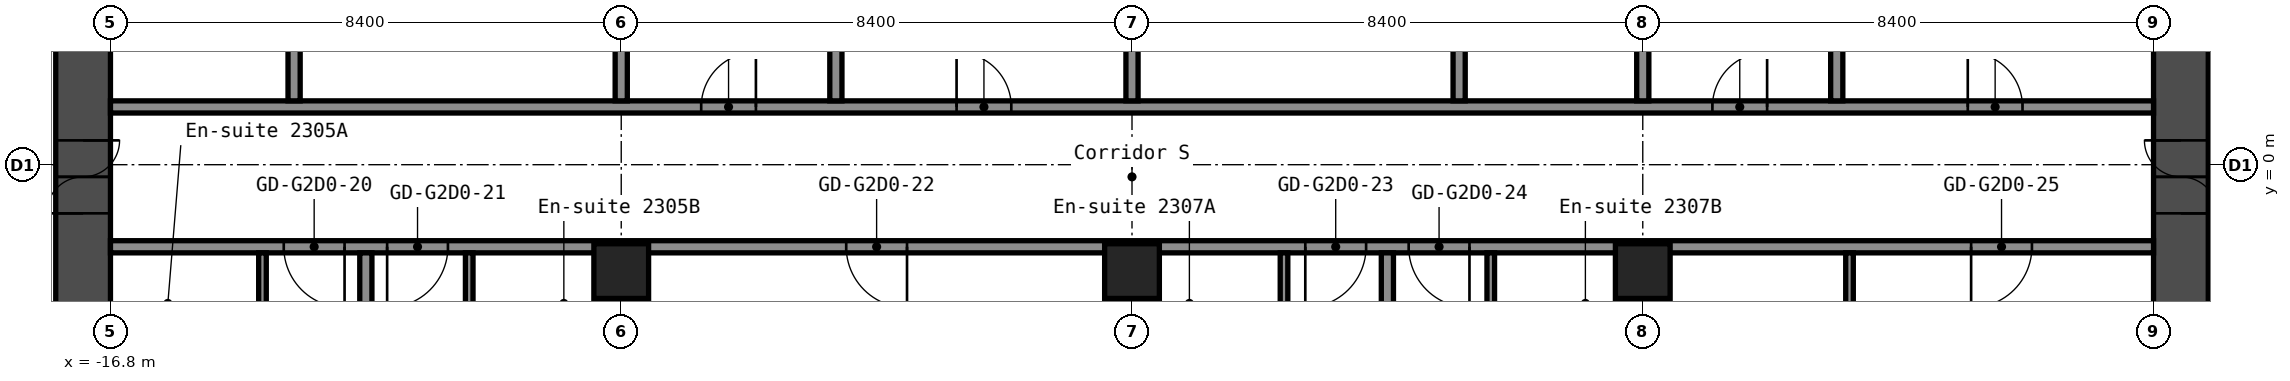
"""IFC4 building model, lengths in metres.
Left out: names, types, materials, properties, quantities, classifications, styles, units other than length and angle.
Written with IfcOpenShell. Run it as: python <this file> out.ifc"""

import sys

from ifc_helpers import new_model, si_unit, direction, frame, frame_2d, origin, origin_2d, place, context, subcontext, project, spatial, rectangle, hollow_rectangle, extrude, element, fill, save


model = new_model("IFC4")
c1 = context("Model", 3, precision=1e-05, world=origin(), true_north=direction((0.0, 1.0)))
c2 = subcontext(c1, "Body", "Model", "MODEL_VIEW")
j1 = project(units=[si_unit("LENGTHUNIT", "METRE"), si_unit("PLANEANGLEUNIT", "RADIAN")], contexts=[c1])
p1 = place(None, origin())
s1 = spatial("IfcSite", under=j1, at=p1, CompositionType="ELEMENT")
p2 = place(p1, origin())
s2 = spatial("IfcBuilding", under=s1, at=p2, CompositionType="ELEMENT")
p3 = place(p2, frame((0.0, 0.0, 85.0)))
s3 = spatial("IfcBuildingStorey", under=s2, at=p3, CompositionType="ELEMENT", Elevation=85.0)
for number, where, z_axis, x_axis in (
    (1, (-8.4, -1.75, 0.0), (0.0, 0.0, 1.0), (1.0, 0.0, 0.0)),
    (2, (0.0, -1.75, 0.0), (0.0, 0.0, 1.0), (1.0, 0.0, 0.0)),
    (3, (8.4, -1.75, 0.0), (0.0, 0.0, 1.0), (1.0, 0.0, 0.0)),
):
    element("IfcColumn", number, at=place(p3, frame(where, z_axis=z_axis, x_axis=x_axis)), inside=s3, PredefinedType="COLUMN", context=c2, shape_type="SweptSolid", body=[
        extrude(hollow_rectangle(XDim=0.9, YDim=0.9, WallThickness=0.036, at=origin_2d()), origin(), (0.0, 0.0, 1.0), 2.8),
    ])
p4 = place(p3, frame((-17.25, -8.4, 0.0), z_axis=(0.0, 0.0, 1.0), x_axis=(0.0, 1.0, 0.0)))
e4 = element("IfcWall", 4, at=p4, inside=s3, PredefinedType="SHEAR", context=c2, shape_type="SweptSolid", body=[
    extrude(rectangle(XDim=16.8, YDim=0.9, at=frame_2d((8.4, 0.0))), origin(), (0.0, 0.0, 1.0), 2.8),
])
p5 = place(p4, frame((7.6, 0.0, 0.0)))
e5 = element("IfcOpeningElement", 5, at=p5, cuts=e4, PredefinedType="OPENING", context=c2, shape_type="SweptSolid", body=[
    extrude(rectangle(XDim=1.2, YDim=2.1, at=frame_2d((0.6, 1.05))), frame((0.0, 0.46, 0.0), z_axis=(0.0, -1.0, 0.0), x_axis=(1.0, 0.0, 0.0)), (0.0, 0.0, 1.0), 0.92),
])
p6 = place(p3, frame((17.25, -8.4, 0.0), z_axis=(0.0, 0.0, 1.0), x_axis=(0.0, 1.0, 0.0)))
e6 = element("IfcWall", 6, at=p6, inside=s3, PredefinedType="SHEAR", context=c2, shape_type="SweptSolid", body=[
    extrude(rectangle(XDim=16.8, YDim=0.9, at=frame_2d((8.4, 0.0))), origin(), (0.0, 0.0, 1.0), 2.8),
])
p7 = place(p6, frame((7.6, 0.0, 0.0)))
e7 = element("IfcOpeningElement", 7, at=p7, cuts=e6, PredefinedType="OPENING", context=c2, shape_type="SweptSolid", body=[
    extrude(rectangle(XDim=1.2, YDim=2.1, at=frame_2d((0.6, 1.05))), frame((0.0, 0.46, 0.0), z_axis=(0.0, -1.0, 0.0), x_axis=(1.0, 0.0, 0.0)), (0.0, 0.0, 1.0), 0.92),
])
p8 = place(p3, frame((-16.8, -1.35, 0.0), z_axis=(0.0, 0.0, 1.0), x_axis=(1.0, 0.0, 0.0)))
e8 = element("IfcWall", 8, at=p8, inside=s3, PredefinedType="PARTITIONING", context=c2, shape_type="SweptSolid", body=[
    extrude(rectangle(XDim=33.6, YDim=0.2, at=frame_2d((16.8, 0.0))), origin(), (0.0, 0.0, 1.0), 2.8),
])
p9 = place(p8, frame((2.85, 0.0, 0.0)))
e9 = element("IfcOpeningElement", 9, at=p9, cuts=e8, PredefinedType="OPENING", context=c2, shape_type="SweptSolid", body=[
    extrude(rectangle(XDim=1.0, YDim=2.1, at=frame_2d((0.5, 1.05))), frame((0.0, 0.11, 0.0), z_axis=(0.0, -1.0, 0.0), x_axis=(1.0, 0.0, 0.0)), (0.0, 0.0, 1.0), 0.22),
])
p10 = place(p8, frame((4.55, 0.0, 0.0)))
e10 = element("IfcOpeningElement", 10, at=p10, cuts=e8, PredefinedType="OPENING", context=c2, shape_type="SweptSolid", body=[
    extrude(rectangle(XDim=1.0, YDim=2.1, at=frame_2d((0.5, 1.05))), frame((0.0, 0.11, 0.0), z_axis=(0.0, -1.0, 0.0), x_axis=(1.0, 0.0, 0.0)), (0.0, 0.0, 1.0), 0.22),
])
p11 = place(p8, frame((12.1, 0.0, 0.0)))
e11 = element("IfcOpeningElement", 11, at=p11, cuts=e8, PredefinedType="OPENING", context=c2, shape_type="SweptSolid", body=[
    extrude(rectangle(XDim=1.0, YDim=2.1, at=frame_2d((0.5, 1.05))), frame((0.0, 0.11, 0.0), z_axis=(0.0, -1.0, 0.0), x_axis=(1.0, 0.0, 0.0)), (0.0, 0.0, 1.0), 0.22),
])
p12 = place(p8, frame((19.65, 0.0, 0.0)))
e12 = element("IfcOpeningElement", 12, at=p12, cuts=e8, PredefinedType="OPENING", context=c2, shape_type="SweptSolid", body=[
    extrude(rectangle(XDim=1.0, YDim=2.1, at=frame_2d((0.5, 1.05))), frame((0.0, 0.11, 0.0), z_axis=(0.0, -1.0, 0.0), x_axis=(1.0, 0.0, 0.0)), (0.0, 0.0, 1.0), 0.22),
])
p13 = place(p8, frame((21.35, 0.0, 0.0)))
e13 = element("IfcOpeningElement", 13, at=p13, cuts=e8, PredefinedType="OPENING", context=c2, shape_type="SweptSolid", body=[
    extrude(rectangle(XDim=1.0, YDim=2.1, at=frame_2d((0.5, 1.05))), frame((0.0, 0.11, 0.0), z_axis=(0.0, -1.0, 0.0), x_axis=(1.0, 0.0, 0.0)), (0.0, 0.0, 1.0), 0.22),
])
p14 = place(p8, frame((30.6, 0.0, 0.0)))
e14 = element("IfcOpeningElement", 14, at=p14, cuts=e8, PredefinedType="OPENING", context=c2, shape_type="SweptSolid", body=[
    extrude(rectangle(XDim=1.0, YDim=2.1, at=frame_2d((0.5, 1.05))), frame((0.0, 0.11, 0.0), z_axis=(0.0, -1.0, 0.0), x_axis=(1.0, 0.0, 0.0)), (0.0, 0.0, 1.0), 0.22),
])
p15 = place(p3, frame((-16.8, 0.95, 0.0), z_axis=(0.0, 0.0, 1.0), x_axis=(1.0, 0.0, 0.0)))
e15 = element("IfcWall", 15, at=p15, inside=s3, PredefinedType="PARTITIONING", context=c2, shape_type="SweptSolid", body=[
    extrude(rectangle(XDim=33.6, YDim=0.2, at=frame_2d((16.8, 0.0))), origin(), (0.0, 0.0, 1.0), 2.8),
])
p16 = place(p15, frame((9.715, 0.0, 0.0)))
e16 = element("IfcOpeningElement", 16, at=p16, cuts=e15, PredefinedType="OPENING", context=c2, shape_type="SweptSolid", body=[
    extrude(rectangle(XDim=0.9, YDim=2.1, at=frame_2d((0.45, 1.05))), frame((0.0, 0.11, 0.0), z_axis=(0.0, -1.0, 0.0), x_axis=(1.0, 0.0, 0.0)), (0.0, 0.0, 1.0), 0.22),
])
p17 = place(p15, frame((13.915, 0.0, 0.0)))
e17 = element("IfcOpeningElement", 17, at=p17, cuts=e15, PredefinedType="OPENING", context=c2, shape_type="SweptSolid", body=[
    extrude(rectangle(XDim=0.9, YDim=2.1, at=frame_2d((0.45, 1.05))), frame((0.0, 0.11, 0.0), z_axis=(0.0, -1.0, 0.0), x_axis=(1.0, 0.0, 0.0)), (0.0, 0.0, 1.0), 0.22),
])
p18 = place(p15, frame((26.345, 0.0, 0.0)))
e18 = element("IfcOpeningElement", 18, at=p18, cuts=e15, PredefinedType="OPENING", context=c2, shape_type="SweptSolid", body=[
    extrude(rectangle(XDim=0.9, YDim=2.1, at=frame_2d((0.45, 1.05))), frame((0.0, 0.11, 0.0), z_axis=(0.0, -1.0, 0.0), x_axis=(1.0, 0.0, 0.0)), (0.0, 0.0, 1.0), 0.22),
])
p19 = place(p15, frame((30.545, 0.0, 0.0)))
e19 = element("IfcOpeningElement", 19, at=p19, cuts=e15, PredefinedType="OPENING", context=c2, shape_type="SweptSolid", body=[
    extrude(rectangle(XDim=0.9, YDim=2.1, at=frame_2d((0.45, 1.05))), frame((0.0, 0.11, 0.0), z_axis=(0.0, -1.0, 0.0), x_axis=(1.0, 0.0, 0.0)), (0.0, 0.0, 1.0), 0.22),
])
p20 = place(p3, frame((-14.3, -4.35, 0.0), z_axis=(0.0, 0.0, 1.0), x_axis=(0.0, 1.0, 0.0)))
e20 = element("IfcWall", 20, at=p20, inside=s3, PredefinedType="PARTITIONING", context=c2, shape_type="SweptSolid", body=[
    extrude(rectangle(XDim=2.9, YDim=0.125, at=frame_2d((1.45, 0.0))), origin(), (0.0, 0.0, 1.0), 2.8),
])
p21 = place(p20, frame((0.6, 0.0, 0.0)))
e21 = element("IfcOpeningElement", 21, at=p21, cuts=e20, PredefinedType="OPENING", context=c2, shape_type="SweptSolid", body=[
    extrude(rectangle(XDim=0.8, YDim=2.1, at=frame_2d((0.4, 1.05))), frame((0.0, 0.073, 0.0), z_axis=(0.0, -1.0, 0.0), x_axis=(1.0, 0.0, 0.0)), (0.0, 0.0, 1.0), 0.145),
])
p22 = place(p3, frame((-13.78, 1.05, 0.0), z_axis=(0.0, 0.0, 1.0), x_axis=(0.0, 1.0, 0.0)))
e22 = element("IfcWall", 22, at=p22, inside=s3, PredefinedType="PARTITIONING", context=c2, shape_type="SweptSolid", body=[
    extrude(rectangle(XDim=5.9, YDim=0.2, at=frame_2d((2.95, 0.0))), origin(), (0.0, 0.0, 1.0), 2.8),
])
p23 = place(p3, frame((-12.6, -15.55, 0.0), z_axis=(0.0, 0.0, 1.0), x_axis=(0.0, 1.0, 0.0)))
e23 = element("IfcWall", 23, at=p23, inside=s3, PredefinedType="PARTITIONING", context=c2, shape_type="SweptSolid", body=[
    extrude(rectangle(XDim=14.1, YDim=0.2, at=frame_2d((7.05, 0.0))), origin(), (0.0, 0.0, 1.0), 2.8),
])
p24 = place(p3, frame((-10.9, -4.35, 0.0), z_axis=(0.0, 0.0, 1.0), x_axis=(0.0, 1.0, 0.0)))
e24 = element("IfcWall", 24, at=p24, inside=s3, PredefinedType="PARTITIONING", context=c2, shape_type="SweptSolid", body=[
    extrude(rectangle(XDim=2.9, YDim=0.125, at=frame_2d((1.45, 0.0))), origin(), (0.0, 0.0, 1.0), 2.8),
])
p25 = place(p24, frame((0.6, 0.0, 0.0)))
e25 = element("IfcOpeningElement", 25, at=p25, cuts=e24, PredefinedType="OPENING", context=c2, shape_type="SweptSolid", body=[
    extrude(rectangle(XDim=0.8, YDim=2.1, at=frame_2d((0.4, 1.05))), frame((0.0, 0.073, 0.0), z_axis=(0.0, -1.0, 0.0), x_axis=(1.0, 0.0, 0.0)), (0.0, 0.0, 1.0), 0.145),
])
p26 = place(p3, frame((-8.4, -15.55, 0.0), z_axis=(0.0, 0.0, 1.0), x_axis=(0.0, 1.0, 0.0)))
e26 = element("IfcWall", 26, at=p26, inside=s3, PredefinedType="PARTITIONING", context=c2, shape_type="SweptSolid", body=[
    extrude(rectangle(XDim=13.36, YDim=0.2, at=frame_2d((6.68, 0.0))), origin(), (0.0, 0.0, 1.0), 2.8),
])
for number, where, z_axis, x_axis in (
    (27, (-8.4, 1.05, 0.0), (0.0, 0.0, 1.0), (0.0, 1.0, 0.0)),
    (28, (-4.87, 1.05, 0.0), (0.0, 0.0, 1.0), (0.0, 1.0, 0.0)),
):
    element("IfcWall", number, at=place(p3, frame(where, z_axis=z_axis, x_axis=x_axis)), inside=s3, PredefinedType="PARTITIONING", context=c2, shape_type="SweptSolid", body=[
        extrude(rectangle(XDim=5.9, YDim=0.2, at=frame_2d((2.95, 0.0))), origin(), (0.0, 0.0, 1.0), 2.8),
    ])
p27 = place(p3, frame((0.0, -15.55, 0.0), z_axis=(0.0, 0.0, 1.0), x_axis=(0.0, 1.0, 0.0)))
e29 = element("IfcWall", 29, at=p27, inside=s3, PredefinedType="PARTITIONING", context=c2, shape_type="SweptSolid", body=[
    extrude(rectangle(XDim=13.36, YDim=0.2, at=frame_2d((6.68, 0.0))), origin(), (0.0, 0.0, 1.0), 2.8),
])
p28 = place(p3, frame((0.0, 1.05, 0.0), z_axis=(0.0, 0.0, 1.0), x_axis=(0.0, 1.0, 0.0)))
e30 = element("IfcWall", 30, at=p28, inside=s3, PredefinedType="PARTITIONING", context=c2, shape_type="SweptSolid", body=[
    extrude(rectangle(XDim=5.9, YDim=0.2, at=frame_2d((2.95, 0.0))), origin(), (0.0, 0.0, 1.0), 2.8),
])
p29 = place(p3, frame((2.5, -4.35, 0.0), z_axis=(0.0, 0.0, 1.0), x_axis=(0.0, 1.0, 0.0)))
e31 = element("IfcWall", 31, at=p29, inside=s3, PredefinedType="PARTITIONING", context=c2, shape_type="SweptSolid", body=[
    extrude(rectangle(XDim=2.9, YDim=0.125, at=frame_2d((1.45, 0.0))), origin(), (0.0, 0.0, 1.0), 2.8),
])
p30 = place(p29, frame((0.6, 0.0, 0.0)))
e32 = element("IfcOpeningElement", 32, at=p30, cuts=e31, PredefinedType="OPENING", context=c2, shape_type="SweptSolid", body=[
    extrude(rectangle(XDim=0.8, YDim=2.1, at=frame_2d((0.4, 1.05))), frame((0.0, 0.073, 0.0), z_axis=(0.0, -1.0, 0.0), x_axis=(1.0, 0.0, 0.0)), (0.0, 0.0, 1.0), 0.145),
])
p31 = place(p3, frame((4.2, -15.55, 0.0), z_axis=(0.0, 0.0, 1.0), x_axis=(0.0, 1.0, 0.0)))
e33 = element("IfcWall", 33, at=p31, inside=s3, PredefinedType="PARTITIONING", context=c2, shape_type="SweptSolid", body=[
    extrude(rectangle(XDim=14.1, YDim=0.2, at=frame_2d((7.05, 0.0))), origin(), (0.0, 0.0, 1.0), 2.8),
])
p32 = place(p3, frame((5.38, 1.05, 0.0), z_axis=(0.0, 0.0, 1.0), x_axis=(0.0, 1.0, 0.0)))
e34 = element("IfcWall", 34, at=p32, inside=s3, PredefinedType="PARTITIONING", context=c2, shape_type="SweptSolid", body=[
    extrude(rectangle(XDim=5.9, YDim=0.2, at=frame_2d((2.95, 0.0))), origin(), (0.0, 0.0, 1.0), 2.8),
])
p33 = place(p3, frame((5.9, -4.35, 0.0), z_axis=(0.0, 0.0, 1.0), x_axis=(0.0, 1.0, 0.0)))
e35 = element("IfcWall", 35, at=p33, inside=s3, PredefinedType="PARTITIONING", context=c2, shape_type="SweptSolid", body=[
    extrude(rectangle(XDim=2.9, YDim=0.125, at=frame_2d((1.45, 0.0))), origin(), (0.0, 0.0, 1.0), 2.8),
])
p34 = place(p33, frame((0.6, 0.0, 0.0)))
e36 = element("IfcOpeningElement", 36, at=p34, cuts=e35, PredefinedType="OPENING", context=c2, shape_type="SweptSolid", body=[
    extrude(rectangle(XDim=0.8, YDim=2.1, at=frame_2d((0.4, 1.05))), frame((0.0, 0.073, 0.0), z_axis=(0.0, -1.0, 0.0), x_axis=(1.0, 0.0, 0.0)), (0.0, 0.0, 1.0), 0.145),
])
p35 = place(p3, frame((8.4, -15.55, 0.0), z_axis=(0.0, 0.0, 1.0), x_axis=(0.0, 1.0, 0.0)))
e37 = element("IfcWall", 37, at=p35, inside=s3, PredefinedType="PARTITIONING", context=c2, shape_type="SweptSolid", body=[
    extrude(rectangle(XDim=13.36, YDim=0.2, at=frame_2d((6.68, 0.0))), origin(), (0.0, 0.0, 1.0), 2.8),
])
for number, where, z_axis, x_axis in (
    (38, (8.4, 1.05, 0.0), (0.0, 0.0, 1.0), (0.0, 1.0, 0.0)),
    (39, (11.59, 1.05, 0.0), (0.0, 0.0, 1.0), (0.0, 1.0, 0.0)),
):
    element("IfcWall", number, at=place(p3, frame(where, z_axis=z_axis, x_axis=x_axis)), inside=s3, PredefinedType="PARTITIONING", context=c2, shape_type="SweptSolid", body=[
        extrude(rectangle(XDim=5.9, YDim=0.2, at=frame_2d((2.95, 0.0))), origin(), (0.0, 0.0, 1.0), 2.8),
    ])
p36 = place(p3, frame((11.8, -4.75, 0.0), z_axis=(0.0, 0.0, 1.0), x_axis=(0.0, 1.0, 0.0)))
e40 = element("IfcWall", 40, at=p36, inside=s3, PredefinedType="PARTITIONING", context=c2, shape_type="SweptSolid", body=[
    extrude(rectangle(XDim=3.3, YDim=0.125, at=frame_2d((1.65, 0.0))), origin(), (0.0, 0.0, 1.0), 2.8),
])
p37 = place(p5, origin())
e41 = element("IfcDoor", 41, at=p37, inside=s3, OperationType="DOUBLE_DOOR_SINGLE_SWING", PredefinedType="DOOR", context=c2, shape_type="SweptSolid", body=[
    extrude(rectangle(XDim=1.2, YDim=2.1, at=frame_2d((0.6, 1.05))), frame((0.0, 0.025, 0.0), z_axis=(0.0, -1.0, 0.0), x_axis=(1.0, 0.0, 0.0)), (0.0, 0.0, 1.0), 0.05),
])
fill(e5, e41)
p38 = place(p7, origin())
e42 = element("IfcDoor", 42, at=p38, inside=s3, OperationType="DOUBLE_DOOR_SINGLE_SWING", PredefinedType="DOOR", context=c2, shape_type="SweptSolid", body=[
    extrude(rectangle(XDim=1.2, YDim=2.1, at=frame_2d((0.6, 1.05))), frame((0.0, 0.025, 0.0), z_axis=(0.0, -1.0, 0.0), x_axis=(1.0, 0.0, 0.0)), (0.0, 0.0, 1.0), 0.05),
])
fill(e7, e42)
p39 = place(p9, origin())
e43 = element("IfcDoor", 43, at=p39, inside=s3, OperationType="SINGLE_SWING_RIGHT", PredefinedType="DOOR", context=c2, shape_type="SweptSolid", body=[
    extrude(rectangle(XDim=1.0, YDim=2.1, at=frame_2d((0.5, 1.05))), frame((0.0, 0.025, 0.0), z_axis=(0.0, -1.0, 0.0), x_axis=(1.0, 0.0, 0.0)), (0.0, 0.0, 1.0), 0.05),
])
fill(e9, e43)
p40 = place(p10, origin())
e44 = element("IfcDoor", 44, at=p40, inside=s3, OperationType="SINGLE_SWING_LEFT", PredefinedType="DOOR", context=c2, shape_type="SweptSolid", body=[
    extrude(rectangle(XDim=1.0, YDim=2.1, at=frame_2d((0.5, 1.05))), frame((0.0, 0.025, 0.0), z_axis=(0.0, -1.0, 0.0), x_axis=(1.0, 0.0, 0.0)), (0.0, 0.0, 1.0), 0.05),
])
fill(e10, e44)
p41 = place(p11, origin())
e45 = element("IfcDoor", 45, at=p41, inside=s3, OperationType="SINGLE_SWING_RIGHT", PredefinedType="DOOR", context=c2, shape_type="SweptSolid", body=[
    extrude(rectangle(XDim=1.0, YDim=2.1, at=frame_2d((0.5, 1.05))), frame((0.0, 0.025, 0.0), z_axis=(0.0, -1.0, 0.0), x_axis=(1.0, 0.0, 0.0)), (0.0, 0.0, 1.0), 0.05),
])
fill(e11, e45)
p42 = place(p12, origin())
e46 = element("IfcDoor", 46, at=p42, inside=s3, OperationType="SINGLE_SWING_LEFT", PredefinedType="DOOR", context=c2, shape_type="SweptSolid", body=[
    extrude(rectangle(XDim=1.0, YDim=2.1, at=frame_2d((0.5, 1.05))), frame((0.0, 0.025, 0.0), z_axis=(0.0, -1.0, 0.0), x_axis=(1.0, 0.0, 0.0)), (0.0, 0.0, 1.0), 0.05),
])
fill(e12, e46)
p43 = place(p13, origin())
e47 = element("IfcDoor", 47, at=p43, inside=s3, OperationType="SINGLE_SWING_RIGHT", PredefinedType="DOOR", context=c2, shape_type="SweptSolid", body=[
    extrude(rectangle(XDim=1.0, YDim=2.1, at=frame_2d((0.5, 1.05))), frame((0.0, 0.025, 0.0), z_axis=(0.0, -1.0, 0.0), x_axis=(1.0, 0.0, 0.0)), (0.0, 0.0, 1.0), 0.05),
])
fill(e13, e47)
p44 = place(p14, origin())
e48 = element("IfcDoor", 48, at=p44, inside=s3, OperationType="SINGLE_SWING_LEFT", PredefinedType="DOOR", context=c2, shape_type="SweptSolid", body=[
    extrude(rectangle(XDim=1.0, YDim=2.1, at=frame_2d((0.5, 1.05))), frame((0.0, 0.025, 0.0), z_axis=(0.0, -1.0, 0.0), x_axis=(1.0, 0.0, 0.0)), (0.0, 0.0, 1.0), 0.05),
])
fill(e14, e48)
p45 = place(p16, origin())
e49 = element("IfcDoor", 49, at=p45, inside=s3, OperationType="SINGLE_SWING_LEFT", PredefinedType="DOOR", context=c2, shape_type="SweptSolid", body=[
    extrude(rectangle(XDim=0.9, YDim=2.1, at=frame_2d((0.45, 1.05))), frame((0.0, 0.025, 0.0), z_axis=(0.0, -1.0, 0.0), x_axis=(1.0, 0.0, 0.0)), (0.0, 0.0, 1.0), 0.05),
])
fill(e16, e49)
p46 = place(p17, origin())
e50 = element("IfcDoor", 50, at=p46, inside=s3, OperationType="SINGLE_SWING_RIGHT", PredefinedType="DOOR", context=c2, shape_type="SweptSolid", body=[
    extrude(rectangle(XDim=0.9, YDim=2.1, at=frame_2d((0.45, 1.05))), frame((0.0, 0.025, 0.0), z_axis=(0.0, -1.0, 0.0), x_axis=(1.0, 0.0, 0.0)), (0.0, 0.0, 1.0), 0.05),
])
fill(e17, e50)
p47 = place(p18, origin())
e51 = element("IfcDoor", 51, at=p47, inside=s3, OperationType="SINGLE_SWING_LEFT", PredefinedType="DOOR", context=c2, shape_type="SweptSolid", body=[
    extrude(rectangle(XDim=0.9, YDim=2.1, at=frame_2d((0.45, 1.05))), frame((0.0, 0.025, 0.0), z_axis=(0.0, -1.0, 0.0), x_axis=(1.0, 0.0, 0.0)), (0.0, 0.0, 1.0), 0.05),
])
fill(e18, e51)
p48 = place(p19, origin())
e52 = element("IfcDoor", 52, at=p48, inside=s3, OperationType="SINGLE_SWING_RIGHT", PredefinedType="DOOR", context=c2, shape_type="SweptSolid", body=[
    extrude(rectangle(XDim=0.9, YDim=2.1, at=frame_2d((0.45, 1.05))), frame((0.0, 0.025, 0.0), z_axis=(0.0, -1.0, 0.0), x_axis=(1.0, 0.0, 0.0)), (0.0, 0.0, 1.0), 0.05),
])
fill(e19, e52)
save(model, sys.argv[1])
